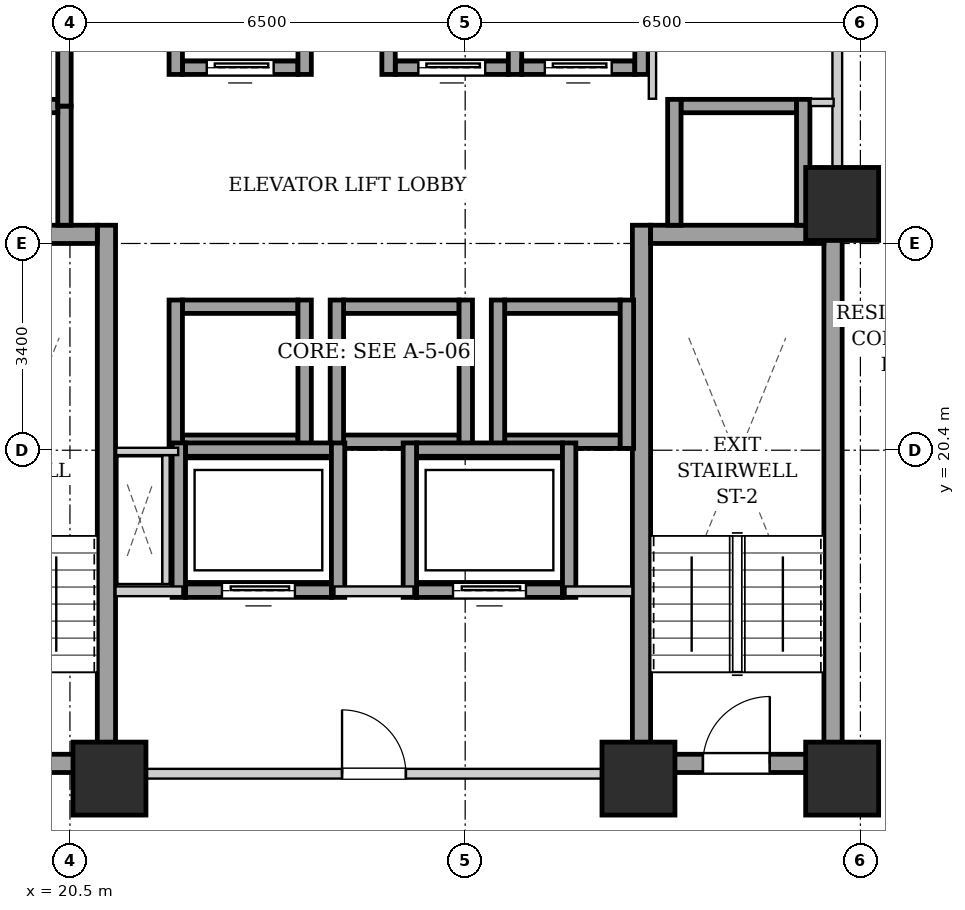
"""IFC4 building model, lengths in metres.
Left out: names, types, materials, properties, quantities, classifications, styles, units other than length and angle.
Written with IfcOpenShell. Run it as: python <this file> out.ifc"""

import sys

from ifc_helpers import new_model, si_unit, direction, frame, frame_2d, origin, origin_2d, place, context, subcontext, project, spatial, rectangle, extrude, element, fill, save


model = new_model("IFC4")
c1 = context("Model", 3, precision=1e-05, world=origin(), true_north=direction((0.0, 1.0)))
c2 = subcontext(c1, "Body", "Model", "MODEL_VIEW")
j1 = project(units=[si_unit("LENGTHUNIT", "METRE"), si_unit("PLANEANGLEUNIT", "RADIAN")], contexts=[c1])
p1 = place(None, origin())
s1 = spatial("IfcSite", under=j1, at=p1, CompositionType="ELEMENT")
p2 = place(p1, origin())
s2 = spatial("IfcBuilding", under=s1, at=p2, CompositionType="ELEMENT")
p3 = place(p2, frame((0.0, 0.0, 25.8)))
s3 = spatial("IfcBuildingStorey", under=s2, at=p3, CompositionType="ELEMENT", Elevation=25.8)
for number, where, z_axis, x_axis in (
    (1, (21.15, 15.0, 0.0), (0.0, 0.0, 1.0), (1.0, 0.0, 0.0)),
    (2, (29.85, 15.0, 0.0), (0.0, 0.0, 1.0), (1.0, 0.0, 0.0)),
    (3, (33.2, 15.0, 0.0), (0.0, 0.0, 1.0), (1.0, 0.0, 0.0)),
    (4, (33.2, 24.45, 0.0), (0.0, 0.0, 1.0), (1.0, 0.0, 0.0)),
):
    element("IfcColumn", number, at=place(p3, frame(where, z_axis=z_axis, x_axis=x_axis)), inside=s3, PredefinedType="COLUMN", context=c2, shape_type="SweptSolid", body=[
        extrude(rectangle(XDim=1.2, YDim=1.2, at=origin_2d()), origin(), (0.0, 0.0, 1.0), 3.2),
    ])
p4 = place(p3, frame((21.1, 15.1, 0.0), z_axis=(0.0, 0.0, 1.0), x_axis=(0.0, 1.0, 0.0)))
e5 = element("IfcWall", 5, at=p4, inside=s3, PredefinedType="SHEAR", context=c2, shape_type="SweptSolid", body=[
    extrude(rectangle(XDim=9.0, YDim=0.3, at=frame_2d((4.5, 0.0))), origin(), (0.0, 0.0, 1.0), 2.94),
])
p5 = place(p3, frame((18.1, 23.95, 0.0), z_axis=(0.0, 0.0, 1.0), x_axis=(1.0, 0.0, 0.0)))
e6 = element("IfcWall", 6, at=p5, inside=s3, PredefinedType="SHEAR", context=c2, shape_type="SweptSolid", body=[
    extrude(rectangle(XDim=2.85, YDim=0.3, at=frame_2d((1.425, 0.0))), origin(), (0.0, 0.0, 1.0), 2.94),
])
p6 = place(p3, frame((18.1, 15.25, 0.0), z_axis=(0.0, 0.0, 1.0), x_axis=(1.0, 0.0, 0.0)))
e7 = element("IfcWall", 7, at=p6, inside=s3, PredefinedType="SHEAR", context=c2, shape_type="SweptSolid", body=[
    extrude(rectangle(XDim=2.85, YDim=0.3, at=frame_2d((1.425, 0.0))), origin(), (0.0, 0.0, 1.0), 2.94),
])
p7 = place(p6, frame((0.86, 0.0, 0.0)))
e8 = element("IfcOpeningElement", 8, at=p7, cuts=e7, PredefinedType="OPENING", context=c2, shape_type="SweptSolid", body=[
    extrude(rectangle(XDim=1.1, YDim=2.05, at=frame_2d((0.55, 1.025))), frame((0.0, 0.16, 0.0), z_axis=(0.0, -1.0, 0.0), x_axis=(1.0, 0.0, 0.0)), (0.0, 0.0, 1.0), 0.32),
])
for number, where, z_axis, x_axis in (
    (9, (29.9, 15.1, 0.0), (0.0, 0.0, 1.0), (0.0, 1.0, 0.0)),
    (10, (33.05, 15.1, 0.0), (0.0, 0.0, 1.0), (0.0, 1.0, 0.0)),
):
    element("IfcWall", number, at=place(p3, frame(where, z_axis=z_axis, x_axis=x_axis)), inside=s3, PredefinedType="SHEAR", context=c2, shape_type="SweptSolid", body=[
        extrude(rectangle(XDim=9.0, YDim=0.3, at=frame_2d((4.5, 0.0))), origin(), (0.0, 0.0, 1.0), 2.94),
    ])
p8 = place(p3, frame((30.05, 23.95, 0.0), z_axis=(0.0, 0.0, 1.0), x_axis=(1.0, 0.0, 0.0)))
e11 = element("IfcWall", 11, at=p8, inside=s3, PredefinedType="SHEAR", context=c2, shape_type="SweptSolid", body=[
    extrude(rectangle(XDim=2.85, YDim=0.3, at=frame_2d((1.425, 0.0))), origin(), (0.0, 0.0, 1.0), 2.94),
])
p9 = place(p3, frame((30.05, 15.25, 0.0), z_axis=(0.0, 0.0, 1.0), x_axis=(1.0, 0.0, 0.0)))
e12 = element("IfcWall", 12, at=p9, inside=s3, PredefinedType="SHEAR", context=c2, shape_type="SweptSolid", body=[
    extrude(rectangle(XDim=2.85, YDim=0.3, at=frame_2d((1.425, 0.0))), origin(), (0.0, 0.0, 1.0), 2.94),
])
p10 = place(p9, frame((0.86, 0.0, 0.0)))
e13 = element("IfcOpeningElement", 13, at=p10, cuts=e12, PredefinedType="OPENING", context=c2, shape_type="SweptSolid", body=[
    extrude(rectangle(XDim=1.1, YDim=2.05, at=frame_2d((0.55, 1.025))), frame((0.0, 0.16, 0.0), z_axis=(0.0, -1.0, 0.0), x_axis=(1.0, 0.0, 0.0)), (0.0, 0.0, 1.0), 0.32),
])
p11 = place(p3, frame((22.35, 26.69, 0.0), z_axis=(0.0, 0.0, 1.0), x_axis=(1.0, 0.0, 0.0)))
e14 = element("IfcWall", 14, at=p11, inside=s3, PredefinedType="SHEAR", context=c2, shape_type="SweptSolid", body=[
    extrude(rectangle(XDim=1.9, YDim=0.22, at=frame_2d((0.95, 0.0))), origin(), (0.0, 0.0, 1.0), 2.94),
])
p12 = place(p11, frame((0.4, 0.0, 0.0)))
e15 = element("IfcOpeningElement", 15, at=p12, cuts=e14, PredefinedType="OPENING", context=c2, shape_type="SweptSolid", body=[
    extrude(rectangle(XDim=1.1, YDim=2.15, at=frame_2d((0.55, 1.075))), frame((0.0, 0.12, 0.0), z_axis=(0.0, -1.0, 0.0), x_axis=(1.0, 0.0, 0.0)), (0.0, 0.0, 1.0), 0.24),
])
for number, where, z_axis, x_axis in (
    (16, (22.24, 26.58, 0.0), (0.0, 0.0, 1.0), (0.0, 1.0, 0.0)),
    (17, (24.36, 26.58, 0.0), (0.0, 0.0, 1.0), (0.0, 1.0, 0.0)),
):
    element("IfcWall", number, at=place(p3, frame(where, z_axis=z_axis, x_axis=x_axis)), inside=s3, PredefinedType="SHEAR", context=c2, shape_type="SweptSolid", body=[
        extrude(rectangle(XDim=2.44, YDim=0.22, at=frame_2d((1.22, 0.0))), origin(), (0.0, 0.0, 1.0), 2.94),
    ])
p13 = place(p3, frame((25.85, 26.69, 0.0), z_axis=(0.0, 0.0, 1.0), x_axis=(1.0, 0.0, 0.0)))
e18 = element("IfcWall", 18, at=p13, inside=s3, PredefinedType="SHEAR", context=c2, shape_type="SweptSolid", body=[
    extrude(rectangle(XDim=1.86, YDim=0.22, at=frame_2d((0.93, 0.0))), origin(), (0.0, 0.0, 1.0), 2.94),
])
p14 = place(p13, frame((0.38, 0.0, 0.0)))
e19 = element("IfcOpeningElement", 19, at=p14, cuts=e18, PredefinedType="OPENING", context=c2, shape_type="SweptSolid", body=[
    extrude(rectangle(XDim=1.1, YDim=2.15, at=frame_2d((0.55, 1.075))), frame((0.0, 0.12, 0.0), z_axis=(0.0, -1.0, 0.0), x_axis=(1.0, 0.0, 0.0)), (0.0, 0.0, 1.0), 0.24),
])
for number, where, z_axis, x_axis in (
    (20, (25.74, 26.58, 0.0), (0.0, 0.0, 1.0), (0.0, 1.0, 0.0)),
    (21, (27.82, 26.58, 0.0), (0.0, 0.0, 1.0), (0.0, 1.0, 0.0)),
):
    element("IfcWall", number, at=place(p3, frame(where, z_axis=z_axis, x_axis=x_axis)), inside=s3, PredefinedType="SHEAR", context=c2, shape_type="SweptSolid", body=[
        extrude(rectangle(XDim=2.44, YDim=0.22, at=frame_2d((1.22, 0.0))), origin(), (0.0, 0.0, 1.0), 2.94),
    ])
p15 = place(p3, frame((27.93, 26.69, 0.0), z_axis=(0.0, 0.0, 1.0), x_axis=(1.0, 0.0, 0.0)))
e22 = element("IfcWall", 22, at=p15, inside=s3, PredefinedType="SHEAR", context=c2, shape_type="SweptSolid", body=[
    extrude(rectangle(XDim=1.86, YDim=0.22, at=frame_2d((0.93, 0.0))), origin(), (0.0, 0.0, 1.0), 2.94),
])
p16 = place(p15, frame((0.38, 0.0, 0.0)))
e23 = element("IfcOpeningElement", 23, at=p16, cuts=e22, PredefinedType="OPENING", context=c2, shape_type="SweptSolid", body=[
    extrude(rectangle(XDim=1.1, YDim=2.15, at=frame_2d((0.55, 1.075))), frame((0.0, 0.12, 0.0), z_axis=(0.0, -1.0, 0.0), x_axis=(1.0, 0.0, 0.0)), (0.0, 0.0, 1.0), 0.24),
])
p17 = place(p3, frame((29.9, 26.58, 0.0), z_axis=(0.0, 0.0, 1.0), x_axis=(0.0, 1.0, 0.0)))
e24 = element("IfcWall", 24, at=p17, inside=s3, PredefinedType="SHEAR", context=c2, shape_type="SweptSolid", body=[
    extrude(rectangle(XDim=2.44, YDim=0.22, at=frame_2d((1.22, 0.0))), origin(), (0.0, 0.0, 1.0), 2.94),
])
for number, where, z_axis, x_axis in (
    (25, (22.35, 20.54, 0.0), (0.0, 0.0, 1.0), (1.0, 0.0, 0.0)),
    (26, (22.35, 22.76, 0.0), (0.0, 0.0, 1.0), (1.0, 0.0, 0.0)),
):
    element("IfcWall", number, at=place(p3, frame(where, z_axis=z_axis, x_axis=x_axis)), inside=s3, PredefinedType="SHEAR", context=c2, shape_type="SweptSolid", body=[
        extrude(rectangle(XDim=1.9, YDim=0.22, at=frame_2d((0.95, 0.0))), origin(), (0.0, 0.0, 1.0), 2.94),
    ])
for number, where, z_axis, x_axis in (
    (27, (22.24, 20.43, 0.0), (0.0, 0.0, 1.0), (0.0, 1.0, 0.0)),
    (28, (24.36, 20.43, 0.0), (0.0, 0.0, 1.0), (0.0, 1.0, 0.0)),
):
    element("IfcWall", number, at=place(p3, frame(where, z_axis=z_axis, x_axis=x_axis)), inside=s3, PredefinedType="SHEAR", context=c2, shape_type="SweptSolid", body=[
        extrude(rectangle(XDim=2.44, YDim=0.22, at=frame_2d((1.22, 0.0))), origin(), (0.0, 0.0, 1.0), 2.94),
    ])
for number, where, z_axis, x_axis in (
    (29, (25.0, 20.54, 0.0), (0.0, 0.0, 1.0), (1.0, 0.0, 0.0)),
    (30, (25.0, 22.76, 0.0), (0.0, 0.0, 1.0), (1.0, 0.0, 0.0)),
):
    element("IfcWall", number, at=place(p3, frame(where, z_axis=z_axis, x_axis=x_axis)), inside=s3, PredefinedType="SHEAR", context=c2, shape_type="SweptSolid", body=[
        extrude(rectangle(XDim=1.9, YDim=0.22, at=frame_2d((0.95, 0.0))), origin(), (0.0, 0.0, 1.0), 2.94),
    ])
for number, where, z_axis, x_axis in (
    (31, (24.89, 20.43, 0.0), (0.0, 0.0, 1.0), (0.0, 1.0, 0.0)),
    (32, (27.01, 20.43, 0.0), (0.0, 0.0, 1.0), (0.0, 1.0, 0.0)),
):
    element("IfcWall", number, at=place(p3, frame(where, z_axis=z_axis, x_axis=x_axis)), inside=s3, PredefinedType="SHEAR", context=c2, shape_type="SweptSolid", body=[
        extrude(rectangle(XDim=2.44, YDim=0.22, at=frame_2d((1.22, 0.0))), origin(), (0.0, 0.0, 1.0), 2.94),
    ])
for number, where, z_axis, x_axis in (
    (33, (27.65, 20.54, 0.0), (0.0, 0.0, 1.0), (1.0, 0.0, 0.0)),
    (34, (27.65, 22.76, 0.0), (0.0, 0.0, 1.0), (1.0, 0.0, 0.0)),
):
    element("IfcWall", number, at=place(p3, frame(where, z_axis=z_axis, x_axis=x_axis)), inside=s3, PredefinedType="SHEAR", context=c2, shape_type="SweptSolid", body=[
        extrude(rectangle(XDim=1.9, YDim=0.22, at=frame_2d((0.95, 0.0))), origin(), (0.0, 0.0, 1.0), 2.94),
    ])
for number, where, z_axis, x_axis in (
    (35, (27.54, 20.43, 0.0), (0.0, 0.0, 1.0), (0.0, 1.0, 0.0)),
    (36, (29.66, 20.43, 0.0), (0.0, 0.0, 1.0), (0.0, 1.0, 0.0)),
):
    element("IfcWall", number, at=place(p3, frame(where, z_axis=z_axis, x_axis=x_axis)), inside=s3, PredefinedType="SHEAR", context=c2, shape_type="SweptSolid", body=[
        extrude(rectangle(XDim=2.44, YDim=0.22, at=frame_2d((1.22, 0.0))), origin(), (0.0, 0.0, 1.0), 2.94),
    ])
p18 = place(p3, frame((20.41, 24.1, 0.0), z_axis=(0.0, 0.0, 1.0), x_axis=(0.0, 1.0, 0.0)))
e37 = element("IfcWall", 37, at=p18, inside=s3, PredefinedType="SHEAR", context=c2, shape_type="SweptSolid", body=[
    extrude(rectangle(XDim=1.96, YDim=0.22, at=frame_2d((0.98, 0.0))), origin(), (0.0, 0.0, 1.0), 2.94),
])
p19 = place(p3, frame((18.4, 26.06, 0.0), z_axis=(0.0, 0.0, 1.0), x_axis=(1.0, 0.0, 0.0)))
e38 = element("IfcWall", 38, at=p19, inside=s3, PredefinedType="SHEAR", context=c2, shape_type="SweptSolid", body=[
    extrude(rectangle(XDim=1.9, YDim=0.22, at=frame_2d((0.95, 0.0))), origin(), (0.0, 0.0, 1.0), 2.94),
])
p20 = place(p3, frame((20.41, 26.06, 0.0), z_axis=(0.0, 0.0, 1.0), x_axis=(0.0, 1.0, 0.0)))
e39 = element("IfcWall", 39, at=p20, inside=s3, PredefinedType="SHEAR", context=c2, shape_type="SweptSolid", body=[
    extrude(rectangle(XDim=2.18, YDim=0.22, at=frame_2d((1.09, 0.0))), origin(), (0.0, 0.0, 1.0), 2.94),
])
p21 = place(p3, frame((30.55, 26.06, 0.0), z_axis=(0.0, 0.0, 1.0), x_axis=(1.0, 0.0, 0.0)))
e40 = element("IfcWall", 40, at=p21, inside=s3, PredefinedType="SHEAR", context=c2, shape_type="SweptSolid", body=[
    extrude(rectangle(XDim=1.9, YDim=0.22, at=frame_2d((0.95, 0.0))), origin(), (0.0, 0.0, 1.0), 2.94),
])
for number, where, z_axis, x_axis in (
    (41, (30.44, 24.1, 0.0), (0.0, 0.0, 1.0), (0.0, 1.0, 0.0)),
    (42, (32.56, 24.1, 0.0), (0.0, 0.0, 1.0), (0.0, 1.0, 0.0)),
):
    element("IfcWall", number, at=place(p3, frame(where, z_axis=z_axis, x_axis=x_axis)), inside=s3, PredefinedType="SHEAR", context=c2, shape_type="SweptSolid", body=[
        extrude(rectangle(XDim=2.07, YDim=0.22, at=frame_2d((1.035, 0.0))), origin(), (0.0, 0.0, 1.0), 2.94),
    ])
p22 = place(p3, frame((22.4, 18.09, 0.0), z_axis=(0.0, 0.0, 1.0), x_axis=(1.0, 0.0, 0.0)))
e43 = element("IfcWall", 43, at=p22, inside=s3, PredefinedType="SHEAR", context=c2, shape_type="SweptSolid", body=[
    extrude(rectangle(XDim=2.4, YDim=0.22, at=frame_2d((1.2, 0.0))), origin(), (0.0, 0.0, 1.0), 2.94),
])
p23 = place(p22, frame((0.6, 0.0, 0.0)))
e44 = element("IfcOpeningElement", 44, at=p23, cuts=e43, PredefinedType="OPENING", context=c2, shape_type="SweptSolid", body=[
    extrude(rectangle(XDim=1.2, YDim=2.15, at=frame_2d((0.6, 1.075))), frame((0.0, 0.12, 0.0), z_axis=(0.0, -1.0, 0.0), x_axis=(1.0, 0.0, 0.0)), (0.0, 0.0, 1.0), 0.24),
])
p24 = place(p3, frame((22.4, 20.41, 0.0), z_axis=(0.0, 0.0, 1.0), x_axis=(1.0, 0.0, 0.0)))
e45 = element("IfcWall", 45, at=p24, inside=s3, PredefinedType="SHEAR", context=c2, shape_type="SweptSolid", body=[
    extrude(rectangle(XDim=2.4, YDim=0.22, at=frame_2d((1.2, 0.0))), origin(), (0.0, 0.0, 1.0), 2.94),
])
for number, where, z_axis, x_axis in (
    (46, (22.29, 17.98, 0.0), (0.0, 0.0, 1.0), (0.0, 1.0, 0.0)),
    (47, (24.91, 17.98, 0.0), (0.0, 0.0, 1.0), (0.0, 1.0, 0.0)),
):
    element("IfcWall", number, at=place(p3, frame(where, z_axis=z_axis, x_axis=x_axis)), inside=s3, PredefinedType="SHEAR", context=c2, shape_type="SweptSolid", body=[
        extrude(rectangle(XDim=2.54, YDim=0.22, at=frame_2d((1.27, 0.0))), origin(), (0.0, 0.0, 1.0), 2.94),
    ])
p25 = place(p3, frame((26.2, 18.09, 0.0), z_axis=(0.0, 0.0, 1.0), x_axis=(1.0, 0.0, 0.0)))
e48 = element("IfcWall", 48, at=p25, inside=s3, PredefinedType="SHEAR", context=c2, shape_type="SweptSolid", body=[
    extrude(rectangle(XDim=2.4, YDim=0.22, at=frame_2d((1.2, 0.0))), origin(), (0.0, 0.0, 1.0), 2.94),
])
p26 = place(p25, frame((0.6, 0.0, 0.0)))
e49 = element("IfcOpeningElement", 49, at=p26, cuts=e48, PredefinedType="OPENING", context=c2, shape_type="SweptSolid", body=[
    extrude(rectangle(XDim=1.2, YDim=2.15, at=frame_2d((0.6, 1.075))), frame((0.0, 0.12, 0.0), z_axis=(0.0, -1.0, 0.0), x_axis=(1.0, 0.0, 0.0)), (0.0, 0.0, 1.0), 0.24),
])
p27 = place(p3, frame((26.2, 20.41, 0.0), z_axis=(0.0, 0.0, 1.0), x_axis=(1.0, 0.0, 0.0)))
e50 = element("IfcWall", 50, at=p27, inside=s3, PredefinedType="SHEAR", context=c2, shape_type="SweptSolid", body=[
    extrude(rectangle(XDim=2.4, YDim=0.22, at=frame_2d((1.2, 0.0))), origin(), (0.0, 0.0, 1.0), 2.94),
])
for number, where, z_axis, x_axis in (
    (51, (26.09, 17.98, 0.0), (0.0, 0.0, 1.0), (0.0, 1.0, 0.0)),
    (52, (28.71, 17.98, 0.0), (0.0, 0.0, 1.0), (0.0, 1.0, 0.0)),
):
    element("IfcWall", number, at=place(p3, frame(where, z_axis=z_axis, x_axis=x_axis)), inside=s3, PredefinedType="SHEAR", context=c2, shape_type="SweptSolid", body=[
        extrude(rectangle(XDim=2.54, YDim=0.22, at=frame_2d((1.27, 0.0))), origin(), (0.0, 0.0, 1.0), 2.94),
    ])
p28 = place(p3, frame((21.25, 15.08, 0.0), z_axis=(0.0, 0.0, 1.0), x_axis=(1.0, 0.0, 0.0)))
e53 = element("IfcWall", 53, at=p28, inside=s3, PredefinedType="PARTITIONING", context=c2, shape_type="SweptSolid", body=[
    extrude(rectangle(XDim=8.5, YDim=0.16, at=frame_2d((4.25, 0.0))), origin(), (0.0, 0.0, 1.0), 2.155),
])
p29 = place(p28, frame((3.725, 0.0, 0.0)))
e54 = element("IfcOpeningElement", 54, at=p29, cuts=e53, PredefinedType="OPENING", context=c2, shape_type="SweptSolid", body=[
    extrude(rectangle(XDim=1.05, YDim=2.05, at=frame_2d((0.525, 1.025))), frame((0.0, 0.09, 0.0), z_axis=(0.0, -1.0, 0.0), x_axis=(1.0, 0.0, 0.0)), (0.0, 0.0, 1.0), 0.18),
])
p30 = place(p3, frame((21.25, 18.08, 0.0), z_axis=(0.0, 0.0, 1.0), x_axis=(1.0, 0.0, 0.0)))
e55 = element("IfcWall", 55, at=p30, inside=s3, PredefinedType="PARTITIONING", context=c2, shape_type="SweptSolid", body=[
    extrude(rectangle(XDim=1.1, YDim=0.16, at=frame_2d((0.55, 0.0))), origin(), (0.0, 0.0, 1.0), 2.94),
])
p31 = place(p3, frame((24.85, 18.08, 0.0), z_axis=(0.0, 0.0, 1.0), x_axis=(1.0, 0.0, 0.0)))
e56 = element("IfcWall", 56, at=p31, inside=s3, PredefinedType="PARTITIONING", context=c2, shape_type="SweptSolid", body=[
    extrude(rectangle(XDim=1.3, YDim=0.16, at=frame_2d((0.65, 0.0))), origin(), (0.0, 0.0, 1.0), 2.94),
])
p32 = place(p3, frame((28.65, 18.08, 0.0), z_axis=(0.0, 0.0, 1.0), x_axis=(1.0, 0.0, 0.0)))
e57 = element("IfcWall", 57, at=p32, inside=s3, PredefinedType="PARTITIONING", context=c2, shape_type="SweptSolid", body=[
    extrude(rectangle(XDim=1.1, YDim=0.16, at=frame_2d((0.55, 0.0))), origin(), (0.0, 0.0, 1.0), 2.94),
])
p33 = place(p3, frame((33.12, 24.12, 0.0), z_axis=(0.0, 0.0, 1.0), x_axis=(0.0, 1.0, 0.0)))
e58 = element("IfcWall", 58, at=p33, inside=s3, PredefinedType="PARTITIONING", context=c2, shape_type="SweptSolid", body=[
    extrude(rectangle(XDim=4.76, YDim=0.16, at=frame_2d((2.38, 0.0))), origin(), (0.0, 0.0, 1.0), 2.94),
])
p34 = place(p3, frame((22.08, 18.2, 0.0), z_axis=(0.0, 0.0, 1.0), x_axis=(0.0, 1.0, 0.0)))
e59 = element("IfcWall", 59, at=p34, inside=s3, PredefinedType="PARTITIONING", context=c2, shape_type="SweptSolid", body=[
    extrude(rectangle(XDim=2.12, YDim=0.12, at=frame_2d((1.06, 0.0))), origin(), (0.0, 0.0, 1.0), 2.94),
])
p35 = place(p3, frame((22.28, 20.38, 0.0), z_axis=(0.0, 0.0, 1.0), x_axis=(-1.0, 0.0, 0.0)))
e60 = element("IfcWall", 60, at=p35, inside=s3, PredefinedType="PARTITIONING", context=c2, shape_type="SweptSolid", body=[
    extrude(rectangle(XDim=1.02, YDim=0.12, at=frame_2d((0.51, 0.0))), origin(), (0.0, 0.0, 1.0), 2.94),
])
p36 = place(p3, frame((30.08, 26.18, 0.0), z_axis=(0.0, 0.0, 1.0), x_axis=(0.0, 1.0, 0.0)))
e61 = element("IfcWall", 61, at=p36, inside=s3, PredefinedType="PARTITIONING", context=c2, shape_type="SweptSolid", body=[
    extrude(rectangle(XDim=2.68, YDim=0.12, at=frame_2d((1.34, 0.0))), origin(), (0.0, 0.0, 1.0), 2.94),
])
p37 = place(p3, frame((32.68, 26.12, 0.0), z_axis=(0.0, 0.0, 1.0), x_axis=(1.0, 0.0, 0.0)))
e62 = element("IfcWall", 62, at=p37, inside=s3, PredefinedType="PARTITIONING", context=c2, shape_type="SweptSolid", body=[
    extrude(rectangle(XDim=0.38, YDim=0.12, at=frame_2d((0.19, 0.0))), origin(), (0.0, 0.0, 1.0), 2.94),
])
p38 = place(p10, origin())
e63 = element("IfcDoor", 63, at=p38, inside=s3, OperationType="SINGLE_SWING_RIGHT", PredefinedType="DOOR", context=c2, shape_type="SweptSolid", body=[
    extrude(rectangle(XDim=1.1, YDim=2.05, at=frame_2d((0.55, 1.025))), frame((0.0, 0.025, 0.0), z_axis=(0.0, -1.0, 0.0), x_axis=(1.0, 0.0, 0.0)), (0.0, 0.0, 1.0), 0.05),
])
fill(e13, e63)
p39 = place(p12, origin())
e64 = element("IfcDoor", 64, at=p39, inside=s3, OperationType="SLIDING_TO_LEFT", PredefinedType="DOOR", context=c2, shape_type="SweptSolid", body=[
    extrude(rectangle(XDim=1.1, YDim=2.15, at=frame_2d((0.55, 1.075))), frame((0.0, 0.025, 0.0), z_axis=(0.0, -1.0, 0.0), x_axis=(1.0, 0.0, 0.0)), (0.0, 0.0, 1.0), 0.05),
])
fill(e15, e64)
p40 = place(p14, origin())
e65 = element("IfcDoor", 65, at=p40, inside=s3, OperationType="SLIDING_TO_LEFT", PredefinedType="DOOR", context=c2, shape_type="SweptSolid", body=[
    extrude(rectangle(XDim=1.1, YDim=2.15, at=frame_2d((0.55, 1.075))), frame((0.0, 0.025, 0.0), z_axis=(0.0, -1.0, 0.0), x_axis=(1.0, 0.0, 0.0)), (0.0, 0.0, 1.0), 0.05),
])
fill(e19, e65)
p41 = place(p16, origin())
e66 = element("IfcDoor", 66, at=p41, inside=s3, OperationType="SLIDING_TO_LEFT", PredefinedType="DOOR", context=c2, shape_type="SweptSolid", body=[
    extrude(rectangle(XDim=1.1, YDim=2.15, at=frame_2d((0.55, 1.075))), frame((0.0, 0.025, 0.0), z_axis=(0.0, -1.0, 0.0), x_axis=(1.0, 0.0, 0.0)), (0.0, 0.0, 1.0), 0.05),
])
fill(e23, e66)
p42 = place(p23, origin())
e67 = element("IfcDoor", 67, at=p42, inside=s3, OperationType="SLIDING_TO_LEFT", PredefinedType="DOOR", context=c2, shape_type="SweptSolid", body=[
    extrude(rectangle(XDim=1.2, YDim=2.15, at=frame_2d((0.6, 1.075))), frame((0.0, 0.025, 0.0), z_axis=(0.0, -1.0, 0.0), x_axis=(1.0, 0.0, 0.0)), (0.0, 0.0, 1.0), 0.05),
])
fill(e44, e67)
p43 = place(p26, origin())
e68 = element("IfcDoor", 68, at=p43, inside=s3, OperationType="SLIDING_TO_LEFT", PredefinedType="DOOR", context=c2, shape_type="SweptSolid", body=[
    extrude(rectangle(XDim=1.2, YDim=2.15, at=frame_2d((0.6, 1.075))), frame((0.0, 0.025, 0.0), z_axis=(0.0, -1.0, 0.0), x_axis=(1.0, 0.0, 0.0)), (0.0, 0.0, 1.0), 0.05),
])
fill(e49, e68)
p44 = place(p29, origin())
e69 = element("IfcDoor", 69, at=p44, inside=s3, OperationType="SINGLE_SWING_LEFT", PredefinedType="DOOR", context=c2, shape_type="SweptSolid", body=[
    extrude(rectangle(XDim=1.05, YDim=2.05, at=frame_2d((0.525, 1.025))), frame((0.0, 0.025, 0.0), z_axis=(0.0, -1.0, 0.0), x_axis=(1.0, 0.0, 0.0)), (0.0, 0.0, 1.0), 0.05),
])
fill(e54, e69)
save(model, sys.argv[1])
